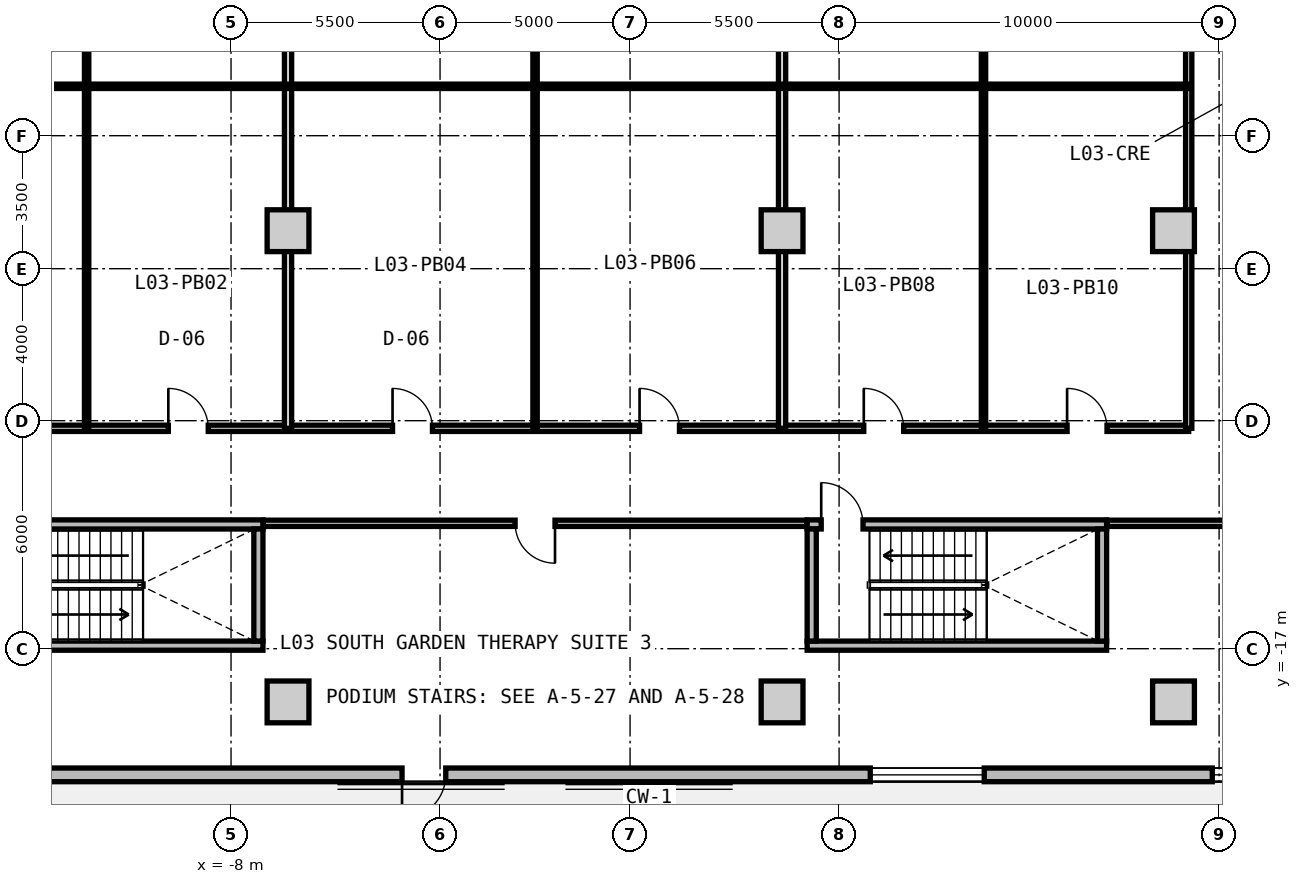
"""IFC4 building model, lengths in metres.
Left out: names, types, materials, properties, quantities, classifications, styles, units other than length and angle.
Written with IfcOpenShell. Run it as: python <this file> out.ifc"""

import sys

from ifc_helpers import new_model, si_unit, direction, frame, frame_2d, origin, origin_2d, place, context, subcontext, project, spatial, rectangle, extrude, source, transform, mapped, element, fill, save


model = new_model("IFC4")
c1 = context("Model", 3, precision=1e-05, world=origin(), true_north=direction((0.0, 1.0)))
c2 = subcontext(c1, "Body", "Model", "MODEL_VIEW")
j1 = project(units=[si_unit("LENGTHUNIT", "METRE"), si_unit("PLANEANGLEUNIT", "RADIAN")], contexts=[c1])
p1 = place(None, origin())
s1 = spatial("IfcSite", under=j1, at=p1, CompositionType="ELEMENT")
p2 = place(p1, origin())
s2 = spatial("IfcBuilding", under=s1, at=p2, CompositionType="ELEMENT")
p3 = place(p2, frame((0.0, 0.0, 12.6)))
s3 = spatial("IfcBuildingStorey", under=s2, at=p3, CompositionType="ELEMENT", Elevation=12.6)
m1 = source(origin(), c2, "Body", "SweptSolid", [
    extrude(rectangle(XDim=1.1, YDim=1.1, at=origin_2d()), origin(), (0.0, 0.0, 1.0), 4.2),
])
for number, where, z_axis, x_axis in (
    (1, (-6.5, -18.4, 0.0), (0.0, 0.0, 1.0), (1.0, 0.0, 0.0)),
    (2, (6.5, -18.4, 0.0), (0.0, 0.0, 1.0), (1.0, 0.0, 0.0)),
    (3, (16.8, -18.4, 0.0), (0.0, 0.0, 1.0), (1.0, 0.0, 0.0)),
    (4, (-6.5, -6.0, 0.0), (0.0, 0.0, 1.0), (1.0, 0.0, 0.0)),
    (5, (6.5, -6.0, 0.0), (0.0, 0.0, 1.0), (1.0, 0.0, 0.0)),
    (6, (16.8, -6.0, 0.0), (0.0, 0.0, 1.0), (1.0, 0.0, 0.0)),
):
    element("IfcColumn", number, at=place(p3, frame(where, z_axis=z_axis, x_axis=x_axis)), inside=s3, PredefinedType="COLUMN", context=c2, shape_type="MappedRepresentation", body=[
        mapped(m1, transform((0.0, 0.0, 0.0), x_axis=(1.0, 0.0, 0.0), y_axis=(0.0, 1.0, 0.0), z_axis=(0.0, 0.0, 1.0), scale=1.0)),
    ])
m2 = source(origin(), c2, "Body", "SweptSolid", [
    extrude(rectangle(XDim=98.84, YDim=0.36, at=frame_2d((49.42, 0.0))), origin(), (0.0, 0.0, 1.0), 3.88),
])
p4 = place(p3, frame((49.42, -20.32, 0.0), z_axis=(0.0, 0.0, 1.0), x_axis=(-1.0, 0.0, 0.0)))
e7 = element("IfcWall", 7, at=p4, inside=s3, PredefinedType="SOLIDWALL", context=c2, shape_type="MappedRepresentation", body=[
    mapped(m2, transform((0.0, 0.0, 0.0), x_axis=(1.0, 0.0, 0.0), y_axis=(0.0, 1.0, 0.0), z_axis=(0.0, 0.0, 1.0), scale=1.0)),
])
p5 = place(p4, frame((51.77, 0.0, 0.0)))
e8 = element("IfcOpeningElement", 8, at=p5, cuts=e7, PredefinedType="OPENING", context=c2, shape_type="SweptSolid", body=[
    extrude(rectangle(XDim=1.15, YDim=2.25, at=frame_2d((0.575, 1.125))), frame((0.0, 0.19, 0.0), z_axis=(0.0, -1.0, 0.0), x_axis=(1.0, 0.0, 0.0)), (0.0, 0.0, 1.0), 0.38),
])
p6 = place(p4, frame((4.0, 0.0, 0.85)))
e9 = element("IfcOpeningElement", 9, at=p6, cuts=e7, PredefinedType="OPENING", context=c2, shape_type="SweptSolid", body=[
    extrude(rectangle(XDim=2.4, YDim=2.2, at=frame_2d((1.2, 1.1))), frame((0.0, 0.19, 0.0), z_axis=(0.0, -1.0, 0.0), x_axis=(1.0, 0.0, 0.0)), (0.0, 0.0, 1.0), 0.38),
])
p7 = place(p4, frame((12.4, 0.0, 0.85)))
e10 = element("IfcOpeningElement", 10, at=p7, cuts=e7, PredefinedType="OPENING", context=c2, shape_type="SweptSolid", body=[
    extrude(rectangle(XDim=3.0, YDim=2.1, at=frame_2d((1.5, 1.05))), frame((0.0, 0.19, 0.0), z_axis=(0.0, -1.0, 0.0), x_axis=(1.0, 0.0, 0.0)), (0.0, 0.0, 1.0), 0.38),
])
p8 = place(p4, frame((29.2, 0.0, 0.85)))
e11 = element("IfcOpeningElement", 11, at=p8, cuts=e7, PredefinedType="OPENING", context=c2, shape_type="SweptSolid", body=[
    extrude(rectangle(XDim=2.4, YDim=2.2, at=frame_2d((1.2, 1.1))), frame((0.0, 0.19, 0.0), z_axis=(0.0, -1.0, 0.0), x_axis=(1.0, 0.0, 0.0)), (0.0, 0.0, 1.0), 0.38),
])
p9 = place(p4, frame((37.6, 0.0, 0.85)))
e12 = element("IfcOpeningElement", 12, at=p9, cuts=e7, PredefinedType="OPENING", context=c2, shape_type="SweptSolid", body=[
    extrude(rectangle(XDim=3.0, YDim=2.1, at=frame_2d((1.5, 1.05))), frame((0.0, 0.19, 0.0), z_axis=(0.0, -1.0, 0.0), x_axis=(1.0, 0.0, 0.0)), (0.0, 0.0, 1.0), 0.38),
])
p10 = place(p4, frame((62.8, 0.0, 0.85)))
e13 = element("IfcOpeningElement", 13, at=p10, cuts=e7, PredefinedType="OPENING", context=c2, shape_type="SweptSolid", body=[
    extrude(rectangle(XDim=3.0, YDim=2.1, at=frame_2d((1.5, 1.05))), frame((0.0, 0.19, 0.0), z_axis=(0.0, -1.0, 0.0), x_axis=(1.0, 0.0, 0.0)), (0.0, 0.0, 1.0), 0.38),
])
p11 = place(p4, frame((71.2, 0.0, 0.9)))
e14 = element("IfcOpeningElement", 14, at=p11, cuts=e7, PredefinedType="OPENING", context=c2, shape_type="SweptSolid", body=[
    extrude(rectangle(XDim=1.8, YDim=2.0, at=frame_2d((0.9, 1.0))), frame((0.0, 0.19, 0.0), z_axis=(0.0, -1.0, 0.0), x_axis=(1.0, 0.0, 0.0)), (0.0, 0.0, 1.0), 0.38),
])
p12 = place(p4, frame((79.6, 0.0, 0.85)))
e15 = element("IfcOpeningElement", 15, at=p12, cuts=e7, PredefinedType="OPENING", context=c2, shape_type="SweptSolid", body=[
    extrude(rectangle(XDim=2.4, YDim=2.2, at=frame_2d((1.2, 1.1))), frame((0.0, 0.19, 0.0), z_axis=(0.0, -1.0, 0.0), x_axis=(1.0, 0.0, 0.0)), (0.0, 0.0, 1.0), 0.38),
])
m3 = source(origin(), c2, "Body", "SweptSolid", [
    extrude(rectangle(XDim=7.88, YDim=0.24, at=frame_2d((3.94, 0.0))), origin(), (0.0, 0.0, 1.0), 3.88),
])
p13 = place(p3, frame((-15.04, -13.73, 0.0), z_axis=(0.0, 0.0, 1.0), x_axis=(1.0, 0.0, 0.0)))
e16 = element("IfcWall", 16, at=p13, inside=s3, PredefinedType="PARTITIONING", context=c2, shape_type="MappedRepresentation", body=[
    mapped(m3, transform((0.0, 0.0, 0.0), x_axis=(1.0, 0.0, 0.0), y_axis=(0.0, 1.0, 0.0), z_axis=(0.0, 0.0, 1.0), scale=1.0)),
])
p14 = place(p13, frame((0.37, 0.0, 0.0)))
e17 = element("IfcOpeningElement", 17, at=p14, cuts=e16, PredefinedType="OPENING", context=c2, shape_type="SweptSolid", body=[
    extrude(rectangle(XDim=1.1, YDim=2.15, at=frame_2d((0.55, 1.075))), frame((0.0, 0.13, 0.0), z_axis=(0.0, -1.0, 0.0), x_axis=(1.0, 0.0, 0.0)), (0.0, 0.0, 1.0), 0.26),
])
p15 = place(p3, frame((-15.04, -16.92, 0.0), z_axis=(0.0, 0.0, 1.0), x_axis=(1.0, 0.0, 0.0)))
e18 = element("IfcWall", 18, at=p15, inside=s3, PredefinedType="PARTITIONING", context=c2, shape_type="MappedRepresentation", body=[
    mapped(m3, transform((0.0, 0.0, 0.0), x_axis=(1.0, 0.0, 0.0), y_axis=(0.0, 1.0, 0.0), z_axis=(0.0, 0.0, 1.0), scale=1.0)),
])
m4 = source(origin(), c2, "Body", "SweptSolid", [
    extrude(rectangle(XDim=2.95, YDim=0.24, at=frame_2d((1.475, 0.0))), origin(), (0.0, 0.0, 1.0), 3.88),
])
p16 = place(p3, frame((-7.28, -16.8, 0.0), z_axis=(0.0, 0.0, 1.0), x_axis=(0.0, 1.0, 0.0)))
e19 = element("IfcWall", 19, at=p16, inside=s3, PredefinedType="PARTITIONING", context=c2, shape_type="MappedRepresentation", body=[
    mapped(m4, transform((0.0, 0.0, 0.0), x_axis=(1.0, 0.0, 0.0), y_axis=(0.0, 1.0, 0.0), z_axis=(0.0, 0.0, 1.0), scale=1.0)),
])
p17 = place(p3, frame((7.16, -13.73, 0.0), z_axis=(0.0, 0.0, 1.0), x_axis=(1.0, 0.0, 0.0)))
e20 = element("IfcWall", 20, at=p17, inside=s3, PredefinedType="PARTITIONING", context=c2, shape_type="MappedRepresentation", body=[
    mapped(m3, transform((0.0, 0.0, 0.0), x_axis=(1.0, 0.0, 0.0), y_axis=(0.0, 1.0, 0.0), z_axis=(0.0, 0.0, 1.0), scale=1.0)),
])
p18 = place(p17, frame((0.37, 0.0, 0.0)))
e21 = element("IfcOpeningElement", 21, at=p18, cuts=e20, PredefinedType="OPENING", context=c2, shape_type="SweptSolid", body=[
    extrude(rectangle(XDim=1.1, YDim=2.15, at=frame_2d((0.55, 1.075))), frame((0.0, 0.13, 0.0), z_axis=(0.0, -1.0, 0.0), x_axis=(1.0, 0.0, 0.0)), (0.0, 0.0, 1.0), 0.26),
])
p19 = place(p3, frame((7.16, -16.92, 0.0), z_axis=(0.0, 0.0, 1.0), x_axis=(1.0, 0.0, 0.0)))
e22 = element("IfcWall", 22, at=p19, inside=s3, PredefinedType="PARTITIONING", context=c2, shape_type="MappedRepresentation", body=[
    mapped(m3, transform((0.0, 0.0, 0.0), x_axis=(1.0, 0.0, 0.0), y_axis=(0.0, 1.0, 0.0), z_axis=(0.0, 0.0, 1.0), scale=1.0)),
])
for number, where, z_axis, x_axis in (
    (23, (7.28, -16.8, 0.0), (0.0, 0.0, 1.0), (0.0, 1.0, 0.0)),
    (24, (14.92, -16.8, 0.0), (0.0, 0.0, 1.0), (0.0, 1.0, 0.0)),
):
    element("IfcWall", number, at=place(p3, frame(where, z_axis=z_axis, x_axis=x_axis)), inside=s3, PredefinedType="PARTITIONING", context=c2, shape_type="MappedRepresentation", body=[
        mapped(m4, transform((0.0, 0.0, 0.0), x_axis=(1.0, 0.0, 0.0), y_axis=(0.0, 1.0, 0.0), z_axis=(0.0, 0.0, 1.0), scale=1.0)),
    ])
m5 = source(origin(), c2, "Body", "SweptSolid", [
    extrude(rectangle(XDim=34.4, YDim=0.165, at=frame_2d((17.2, 0.0))), origin(), (0.0, 0.0, 1.0), 3.865),
])
p20 = place(p3, frame((-17.2, -11.2, 0.0), z_axis=(0.0, 0.0, 1.0), x_axis=(1.0, 0.0, 0.0)))
e25 = element("IfcWall", 25, at=p20, inside=s3, PredefinedType="PARTITIONING", context=c2, shape_type="MappedRepresentation", body=[
    mapped(m5, transform((0.0, 0.0, 0.0), x_axis=(1.0, 0.0, 0.0), y_axis=(0.0, 1.0, 0.0), z_axis=(0.0, 0.0, 1.0), scale=1.0)),
])
p21 = place(p20, frame((2.2, 0.0, 0.0)))
e26 = element("IfcOpeningElement", 26, at=p21, cuts=e25, PredefinedType="OPENING", context=c2, shape_type="SweptSolid", body=[
    extrude(rectangle(XDim=1.05, YDim=2.15, at=frame_2d((0.525, 1.075))), frame((0.0, 0.093, 0.0), z_axis=(0.0, -1.0, 0.0), x_axis=(1.0, 0.0, 0.0)), (0.0, 0.0, 1.0), 0.185),
])
p22 = place(p20, frame((7.55, 0.0, 0.0)))
e27 = element("IfcOpeningElement", 27, at=p22, cuts=e25, PredefinedType="OPENING", context=c2, shape_type="SweptSolid", body=[
    extrude(rectangle(XDim=1.05, YDim=2.15, at=frame_2d((0.525, 1.075))), frame((0.0, 0.093, 0.0), z_axis=(0.0, -1.0, 0.0), x_axis=(1.0, 0.0, 0.0)), (0.0, 0.0, 1.0), 0.185),
])
p23 = place(p20, frame((13.45, 0.0, 0.0)))
e28 = element("IfcOpeningElement", 28, at=p23, cuts=e25, PredefinedType="OPENING", context=c2, shape_type="SweptSolid", body=[
    extrude(rectangle(XDim=1.05, YDim=2.15, at=frame_2d((0.525, 1.075))), frame((0.0, 0.093, 0.0), z_axis=(0.0, -1.0, 0.0), x_axis=(1.0, 0.0, 0.0)), (0.0, 0.0, 1.0), 0.185),
])
p24 = place(p20, frame((19.95, 0.0, 0.0)))
e29 = element("IfcOpeningElement", 29, at=p24, cuts=e25, PredefinedType="OPENING", context=c2, shape_type="SweptSolid", body=[
    extrude(rectangle(XDim=1.05, YDim=2.15, at=frame_2d((0.525, 1.075))), frame((0.0, 0.093, 0.0), z_axis=(0.0, -1.0, 0.0), x_axis=(1.0, 0.0, 0.0)), (0.0, 0.0, 1.0), 0.185),
])
p25 = place(p20, frame((25.85, 0.0, 0.0)))
e30 = element("IfcOpeningElement", 30, at=p25, cuts=e25, PredefinedType="OPENING", context=c2, shape_type="SweptSolid", body=[
    extrude(rectangle(XDim=1.05, YDim=2.15, at=frame_2d((0.525, 1.075))), frame((0.0, 0.093, 0.0), z_axis=(0.0, -1.0, 0.0), x_axis=(1.0, 0.0, 0.0)), (0.0, 0.0, 1.0), 0.185),
])
p26 = place(p20, frame((31.2, 0.0, 0.0)))
e31 = element("IfcOpeningElement", 31, at=p26, cuts=e25, PredefinedType="OPENING", context=c2, shape_type="SweptSolid", body=[
    extrude(rectangle(XDim=1.05, YDim=2.15, at=frame_2d((0.525, 1.075))), frame((0.0, 0.093, 0.0), z_axis=(0.0, -1.0, 0.0), x_axis=(1.0, 0.0, 0.0)), (0.0, 0.0, 1.0), 0.185),
])
m6 = source(origin(), c2, "Body", "SweptSolid", [
    extrude(rectangle(XDim=17.6, YDim=0.165, at=frame_2d((8.8, 0.0))), origin(), (0.0, 0.0, 1.0), 3.865),
])
p27 = place(p3, frame((17.2, -11.2, 0.0), z_axis=(0.0, 0.0, 1.0), x_axis=(0.0, 1.0, 0.0)))
e32 = element("IfcWall", 32, at=p27, inside=s3, PredefinedType="PARTITIONING", context=c2, shape_type="MappedRepresentation", body=[
    mapped(m6, transform((0.0, 0.0, 0.0), x_axis=(1.0, 0.0, 0.0), y_axis=(0.0, 1.0, 0.0), z_axis=(0.0, 0.0, 1.0), scale=1.0)),
])
m7 = source(origin(), c2, "Body", "SweptSolid", [
    extrude(rectangle(XDim=17.6, YDim=0.19, at=frame_2d((8.8, 0.0))), origin(), (0.0, 0.0, 1.0), 3.215),
])
for number, where, z_axis, x_axis in (
    (33, (-6.5, -11.2, 0.0), (0.0, 0.0, 1.0), (0.0, 1.0, 0.0)),
    (34, (6.5, -11.2, 0.0), (0.0, 0.0, 1.0), (0.0, 1.0, 0.0)),
):
    element("IfcWall", number, at=place(p3, frame(where, z_axis=z_axis, x_axis=x_axis)), inside=s3, PredefinedType="PARTITIONING", context=c2, shape_type="MappedRepresentation", body=[
        mapped(m7, transform((0.0, 0.0, 0.0), x_axis=(1.0, 0.0, 0.0), y_axis=(0.0, 1.0, 0.0), z_axis=(0.0, 0.0, 1.0), scale=1.0)),
    ])
m8 = source(origin(), c2, "Body", "SweptSolid", [
    extrude(rectangle(XDim=17.6, YDim=0.115, at=frame_2d((8.8, 0.0))), origin(), (0.0, 0.0, 1.0), 3.865),
])
for number, where, z_axis, x_axis in (
    (35, (-11.8, -11.2, 0.0), (0.0, 0.0, 1.0), (0.0, 1.0, 0.0)),
    (36, (0.0, -11.2, 0.0), (0.0, 0.0, 1.0), (0.0, 1.0, 0.0)),
    (37, (11.8, -11.2, 0.0), (0.0, 0.0, 1.0), (0.0, 1.0, 0.0)),
):
    element("IfcWall", number, at=place(p3, frame(where, z_axis=z_axis, x_axis=x_axis)), inside=s3, PredefinedType="PARTITIONING", context=c2, shape_type="MappedRepresentation", body=[
        mapped(m8, transform((0.0, 0.0, 0.0), x_axis=(1.0, 0.0, 0.0), y_axis=(0.0, 1.0, 0.0), z_axis=(0.0, 0.0, 1.0), scale=1.0)),
    ])
m9 = source(origin(), c2, "Body", "SweptSolid", [
    extrude(rectangle(XDim=34.4, YDim=0.115, at=frame_2d((17.2, 0.0))), origin(), (0.0, 0.0, 1.0), 3.865),
])
p28 = place(p3, frame((-17.2, -2.2, 0.0), z_axis=(0.0, 0.0, 1.0), x_axis=(1.0, 0.0, 0.0)))
e38 = element("IfcWall", 38, at=p28, inside=s3, PredefinedType="PARTITIONING", context=c2, shape_type="MappedRepresentation", body=[
    mapped(m9, transform((0.0, 0.0, 0.0), x_axis=(1.0, 0.0, 0.0), y_axis=(0.0, 1.0, 0.0), z_axis=(0.0, 0.0, 1.0), scale=1.0)),
])
m10 = source(origin(), c2, "Body", "SweptSolid", [
    extrude(rectangle(XDim=14.3, YDim=0.165, at=frame_2d((7.15, 0.0))), origin(), (0.0, 0.0, 1.0), 3.865),
])
p29 = place(p3, frame((-7.15, -13.7, 0.0), z_axis=(0.0, 0.0, 1.0), x_axis=(1.0, 0.0, 0.0)))
e39 = element("IfcWall", 39, at=p29, inside=s3, PredefinedType="PARTITIONING", context=c2, shape_type="MappedRepresentation", body=[
    mapped(m10, transform((0.0, 0.0, 0.0), x_axis=(1.0, 0.0, 0.0), y_axis=(0.0, 1.0, 0.0), z_axis=(0.0, 0.0, 1.0), scale=1.0)),
])
p30 = place(p29, frame((6.625, 0.0, 0.0)))
e40 = element("IfcOpeningElement", 40, at=p30, cuts=e39, PredefinedType="OPENING", context=c2, shape_type="SweptSolid", body=[
    extrude(rectangle(XDim=1.05, YDim=2.15, at=frame_2d((0.525, 1.075))), frame((0.0, 0.093, 0.0), z_axis=(0.0, -1.0, 0.0), x_axis=(1.0, 0.0, 0.0)), (0.0, 0.0, 1.0), 0.185),
])
p31 = place(p3, frame((15.05, -13.7, 0.0), z_axis=(0.0, 0.0, 1.0), x_axis=(1.0, 0.0, 0.0)))
e41 = element("IfcWall", 41, at=p31, inside=s3, PredefinedType="PARTITIONING", context=c2, shape_type="MappedRepresentation", body=[
    mapped(m5, transform((0.0, 0.0, 0.0), x_axis=(1.0, 0.0, 0.0), y_axis=(0.0, 1.0, 0.0), z_axis=(0.0, 0.0, 1.0), scale=1.0)),
])
p32 = place(p31, frame((5.95, 0.0, 0.0)))
e42 = element("IfcOpeningElement", 42, at=p32, cuts=e41, PredefinedType="OPENING", context=c2, shape_type="SweptSolid", body=[
    extrude(rectangle(XDim=1.05, YDim=2.15, at=frame_2d((0.525, 1.075))), frame((0.0, 0.093, 0.0), z_axis=(0.0, -1.0, 0.0), x_axis=(1.0, 0.0, 0.0)), (0.0, 0.0, 1.0), 0.185),
])
p33 = place(p31, frame((23.025, 0.0, 0.0)))
e43 = element("IfcOpeningElement", 43, at=p33, cuts=e41, PredefinedType="OPENING", context=c2, shape_type="SweptSolid", body=[
    extrude(rectangle(XDim=1.05, YDim=2.15, at=frame_2d((0.525, 1.075))), frame((0.0, 0.093, 0.0), z_axis=(0.0, -1.0, 0.0), x_axis=(1.0, 0.0, 0.0)), (0.0, 0.0, 1.0), 0.185),
])
m11 = source(origin(), c2, "Body", "SweptSolid", [
    extrude(rectangle(XDim=1.15, YDim=2.25, at=frame_2d((0.575, 1.125))), frame((0.0, 0.025, 0.0), z_axis=(0.0, -1.0, 0.0), x_axis=(1.0, 0.0, 0.0)), (0.0, 0.0, 1.0), 0.05),
])
p34 = place(p5, origin())
e44 = element("IfcDoor", 44, at=p34, inside=s3, OperationType="SINGLE_SWING_RIGHT", PredefinedType="DOOR", context=c2, shape_type="MappedRepresentation", body=[
    mapped(m11, transform((0.0, 0.0, 0.0), x_axis=(1.0, 0.0, 0.0), y_axis=(0.0, 1.0, 0.0), z_axis=(0.0, 0.0, 1.0), scale=1.0)),
])
fill(e8, e44)
m12 = source(origin(), c2, "Body", "SweptSolid", [
    extrude(rectangle(XDim=2.4, YDim=2.2, at=frame_2d((1.2, 1.1))), frame((0.0, 0.03, 0.0), z_axis=(0.0, -1.0, 0.0), x_axis=(1.0, 0.0, 0.0)), (0.0, 0.0, 1.0), 0.06),
])
p35 = place(p8, origin())
e45 = element("IfcWindow", 45, at=p35, inside=s3, PartitioningType="SINGLE_PANEL", PredefinedType="WINDOW", context=c2, shape_type="MappedRepresentation", body=[
    mapped(m12, transform((0.0, 0.0, 0.0), x_axis=(1.0, 0.0, 0.0), y_axis=(0.0, 1.0, 0.0), z_axis=(0.0, 0.0, 1.0), scale=1.0)),
])
fill(e11, e45)
m13 = source(origin(), c2, "Body", "SweptSolid", [
    extrude(rectangle(XDim=3.0, YDim=2.1, at=frame_2d((1.5, 1.05))), frame((0.0, 0.03, 0.0), z_axis=(0.0, -1.0, 0.0), x_axis=(1.0, 0.0, 0.0)), (0.0, 0.0, 1.0), 0.06),
])
p36 = place(p9, origin())
e46 = element("IfcWindow", 46, at=p36, inside=s3, PartitioningType="SINGLE_PANEL", PredefinedType="WINDOW", context=c2, shape_type="MappedRepresentation", body=[
    mapped(m13, transform((0.0, 0.0, 0.0), x_axis=(1.0, 0.0, 0.0), y_axis=(0.0, 1.0, 0.0), z_axis=(0.0, 0.0, 1.0), scale=1.0)),
])
fill(e12, e46)
m14 = source(origin(), c2, "Body", "SweptSolid", [
    extrude(rectangle(XDim=1.1, YDim=2.15, at=frame_2d((0.55, 1.075))), frame((0.0, 0.025, 0.0), z_axis=(0.0, -1.0, 0.0), x_axis=(1.0, 0.0, 0.0)), (0.0, 0.0, 1.0), 0.05),
])
p37 = place(p18, origin())
e47 = element("IfcDoor", 47, at=p37, inside=s3, OperationType="SINGLE_SWING_LEFT", PredefinedType="DOOR", context=c2, shape_type="MappedRepresentation", body=[
    mapped(m14, transform((0.0, 0.0, 0.0), x_axis=(1.0, 0.0, 0.0), y_axis=(0.0, 1.0, 0.0), z_axis=(0.0, 0.0, 1.0), scale=1.0)),
])
fill(e21, e47)
m15 = source(origin(), c2, "Body", "SweptSolid", [
    extrude(rectangle(XDim=1.05, YDim=2.15, at=frame_2d((0.525, 1.075))), frame((0.0, 0.025, 0.0), z_axis=(0.0, -1.0, 0.0), x_axis=(1.0, 0.0, 0.0)), (0.0, 0.0, 1.0), 0.05),
])
p38 = place(p22, origin())
e48 = element("IfcDoor", 48, at=p38, inside=s3, OperationType="SINGLE_SWING_LEFT", PredefinedType="DOOR", context=c2, shape_type="MappedRepresentation", body=[
    mapped(m15, transform((0.0, 0.0, 0.0), x_axis=(1.0, 0.0, 0.0), y_axis=(0.0, 1.0, 0.0), z_axis=(0.0, 0.0, 1.0), scale=1.0)),
])
fill(e27, e48)
p39 = place(p23, origin())
e49 = element("IfcDoor", 49, at=p39, inside=s3, OperationType="SINGLE_SWING_LEFT", PredefinedType="DOOR", context=c2, shape_type="MappedRepresentation", body=[
    mapped(m15, transform((0.0, 0.0, 0.0), x_axis=(1.0, 0.0, 0.0), y_axis=(0.0, 1.0, 0.0), z_axis=(0.0, 0.0, 1.0), scale=1.0)),
])
fill(e28, e49)
p40 = place(p24, origin())
e50 = element("IfcDoor", 50, at=p40, inside=s3, OperationType="SINGLE_SWING_LEFT", PredefinedType="DOOR", context=c2, shape_type="MappedRepresentation", body=[
    mapped(m15, transform((0.0, 0.0, 0.0), x_axis=(1.0, 0.0, 0.0), y_axis=(0.0, 1.0, 0.0), z_axis=(0.0, 0.0, 1.0), scale=1.0)),
])
fill(e29, e50)
p41 = place(p25, origin())
e51 = element("IfcDoor", 51, at=p41, inside=s3, OperationType="SINGLE_SWING_LEFT", PredefinedType="DOOR", context=c2, shape_type="MappedRepresentation", body=[
    mapped(m15, transform((0.0, 0.0, 0.0), x_axis=(1.0, 0.0, 0.0), y_axis=(0.0, 1.0, 0.0), z_axis=(0.0, 0.0, 1.0), scale=1.0)),
])
fill(e30, e51)
p42 = place(p26, origin())
e52 = element("IfcDoor", 52, at=p42, inside=s3, OperationType="SINGLE_SWING_LEFT", PredefinedType="DOOR", context=c2, shape_type="MappedRepresentation", body=[
    mapped(m15, transform((0.0, 0.0, 0.0), x_axis=(1.0, 0.0, 0.0), y_axis=(0.0, 1.0, 0.0), z_axis=(0.0, 0.0, 1.0), scale=1.0)),
])
fill(e31, e52)
p43 = place(p30, frame((1.05, 0.0, 0.0), z_axis=(0.0, 0.0, 1.0), x_axis=(-1.0, 0.0, 0.0)))
e53 = element("IfcDoor", 53, at=p43, inside=s3, OperationType="SINGLE_SWING_LEFT", PredefinedType="DOOR", context=c2, shape_type="MappedRepresentation", body=[
    mapped(m15, transform((0.0, 0.0, 0.0), x_axis=(1.0, 0.0, 0.0), y_axis=(0.0, 1.0, 0.0), z_axis=(0.0, 0.0, 1.0), scale=1.0)),
])
fill(e40, e53)
save(model, sys.argv[1])
